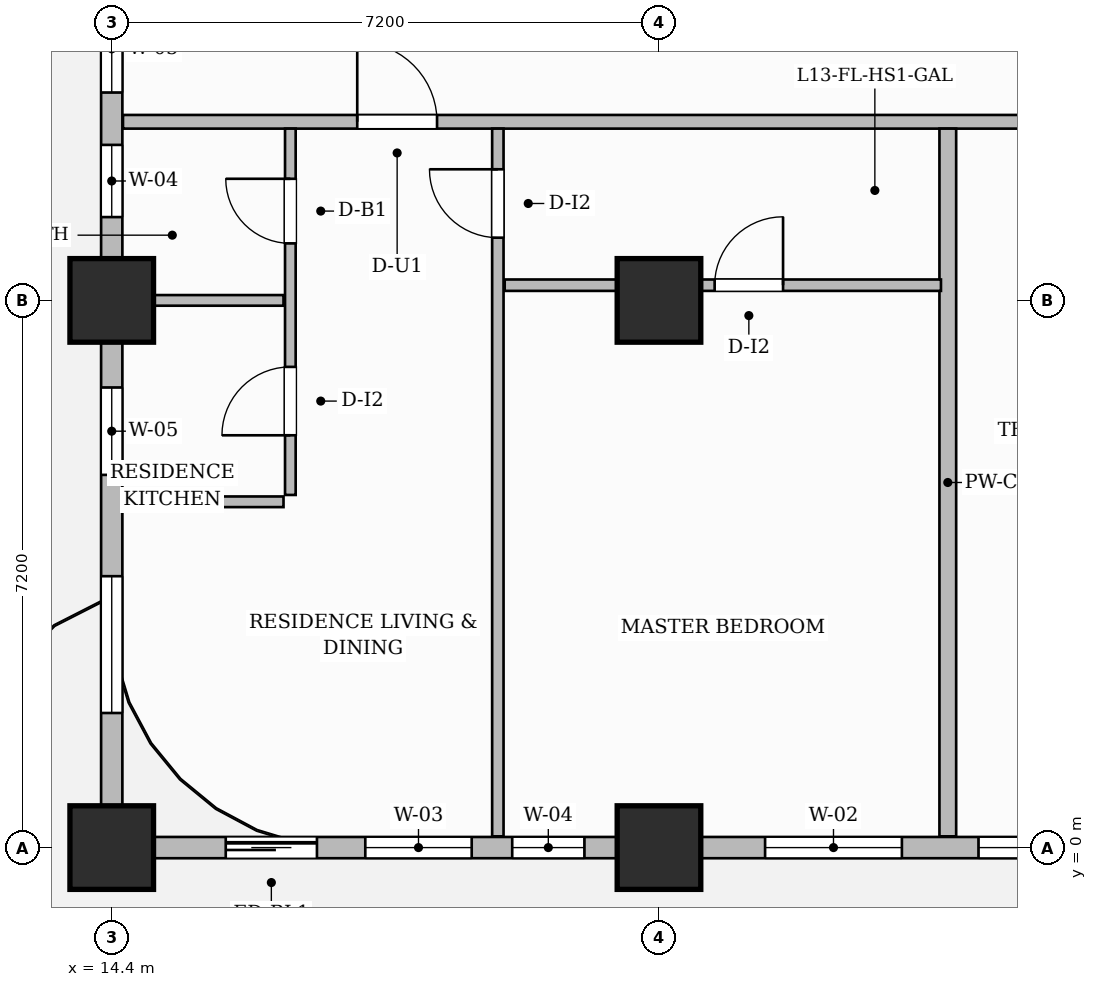
"""IFC4 building model, lengths in metres.
Left out: names, types, materials, properties, quantities, classifications, styles, units other than length and angle.
Written with IfcOpenShell. Run it as: python <this file> out.ifc"""

import sys

from ifc_helpers import new_model, si_unit, direction, frame, frame_2d, origin, origin_2d, place, context, subcontext, project, spatial, rectangle, extrude, source, transform, mapped, element, fill, save


model = new_model("IFC4")
c1 = context("Model", 3, precision=1e-05, world=origin(), true_north=direction((0.0, 1.0)))
c2 = subcontext(c1, "Body", "Model", "MODEL_VIEW")
j1 = project(units=[si_unit("LENGTHUNIT", "METRE"), si_unit("PLANEANGLEUNIT", "RADIAN")], contexts=[c1])
p1 = place(None, origin())
s1 = spatial("IfcSite", under=j1, at=p1, CompositionType="ELEMENT")
p2 = place(p1, origin())
s2 = spatial("IfcBuilding", under=s1, at=p2, CompositionType="ELEMENT")
p3 = place(p2, frame((0.0, 0.0, 58.3)))
s3 = spatial("IfcBuildingStorey", under=s2, at=p3, CompositionType="ELEMENT", Elevation=58.3)
m1 = source(origin(), c2, "Body", "SweptSolid", [
    extrude(rectangle(XDim=1.1, YDim=1.1, at=origin_2d()), origin(), (0.0, 0.0, 1.0), 3.7),
])
for number, where, z_axis, x_axis in (
    (1, (14.4, 0.0, 0.0), (0.0, 0.0, 1.0), (1.0, 0.0, 0.0)),
    (2, (14.4, 7.2, 0.0), (0.0, 0.0, 1.0), (1.0, 0.0, 0.0)),
    (3, (21.6, 0.0, 0.0), (0.0, 0.0, 1.0), (1.0, 0.0, 0.0)),
    (4, (21.6, 7.2, 0.0), (0.0, 0.0, 1.0), (1.0, 0.0, 0.0)),
):
    element("IfcColumn", number, at=place(p3, frame(where, z_axis=z_axis, x_axis=x_axis)), inside=s3, PredefinedType="COLUMN", context=c2, shape_type="MappedRepresentation", body=[
        mapped(m1, transform((0.0, 0.0, 0.0), scale=1.0)),
    ])
p4 = place(p3, frame((14.548, 9.55, 0.0), z_axis=(0.0, 0.0, 1.0), x_axis=(1.0, 0.0, 0.0)))
e5 = element("IfcWall", 5, at=p4, inside=s3, PredefinedType="PARTITIONING", context=c2, shape_type="SweptSolid", body=[
    extrude(rectangle(XDim=15.562, YDim=0.18, at=frame_2d((7.781, 0.0))), origin(), (0.0, 0.0, 1.0), 3.45),
])
p5 = place(p4, frame((3.082, 0.0, 0.0)))
e6 = element("IfcOpeningElement", 6, at=p5, cuts=e5, PredefinedType="OPENING", context=c2, shape_type="SweptSolid", body=[
    extrude(rectangle(XDim=1.05, YDim=2.25, at=frame_2d((0.525, 1.125))), frame((0.0, 0.1, 0.0), z_axis=(0.0, -1.0, 0.0), x_axis=(1.0, 0.0, 0.0)), (0.0, 0.0, 1.0), 0.2),
])
p6 = place(p4, frame((12.552, 0.0, 0.0)))
e7 = element("IfcOpeningElement", 7, at=p6, cuts=e5, PredefinedType="OPENING", context=c2, shape_type="SweptSolid", body=[
    extrude(rectangle(XDim=1.4, YDim=2.35, at=frame_2d((0.7, 1.175))), frame((0.0, 0.1, 0.0), z_axis=(0.0, -1.0, 0.0), x_axis=(1.0, 0.0, 0.0)), (0.0, 0.0, 1.0), 0.2),
])
p7 = place(p3, frame((25.4, 0.148, 0.0), z_axis=(0.0, 0.0, 1.0), x_axis=(0.0, 1.0, 0.0)))
e8 = element("IfcWall", 8, at=p7, inside=s3, PredefinedType="PARTITIONING", context=c2, shape_type="SweptSolid", body=[
    extrude(rectangle(XDim=9.312, YDim=0.22, at=frame_2d((4.656, 0.0))), origin(), (0.0, 0.0, 1.0), 3.035),
])
p8 = place(p3, frame((16.75, 4.64, 0.0), z_axis=(0.0, 0.0, 1.0), x_axis=(0.0, 1.0, 0.0)))
e9 = element("IfcWall", 9, at=p8, inside=s3, PredefinedType="PARTITIONING", context=c2, shape_type="SweptSolid", body=[
    extrude(rectangle(XDim=4.82, YDim=0.14, at=frame_2d((2.41, 0.0))), origin(), (0.0, 0.0, 1.0), 3.45),
])
p9 = place(p8, frame((0.785, 0.0, 0.0)))
e10 = element("IfcOpeningElement", 10, at=p9, cuts=e9, PredefinedType="OPENING", context=c2, shape_type="SweptSolid", body=[
    extrude(rectangle(XDim=0.9, YDim=2.15, at=frame_2d((0.45, 1.075))), frame((0.0, 0.08, 0.0), z_axis=(0.0, -1.0, 0.0), x_axis=(1.0, 0.0, 0.0)), (0.0, 0.0, 1.0), 0.16),
])
p10 = place(p8, frame((3.31, 0.0, 0.0)))
e11 = element("IfcOpeningElement", 11, at=p10, cuts=e9, PredefinedType="OPENING", context=c2, shape_type="SweptSolid", body=[
    extrude(rectangle(XDim=0.85, YDim=2.1, at=frame_2d((0.425, 1.05))), frame((0.0, 0.08, 0.0), z_axis=(0.0, -1.0, 0.0), x_axis=(1.0, 0.0, 0.0)), (0.0, 0.0, 1.0), 0.16),
])
p11 = place(p3, frame((14.59, 7.2, 0.0), z_axis=(0.0, 0.0, 1.0), x_axis=(1.0, 0.0, 0.0)))
e12 = element("IfcWall", 12, at=p11, inside=s3, PredefinedType="PARTITIONING", context=c2, shape_type="SweptSolid", body=[
    extrude(rectangle(XDim=2.07, YDim=0.14, at=frame_2d((1.035, 0.0))), origin(), (0.0, 0.0, 1.0), 2.885),
])
p12 = place(p3, frame((14.548, 4.55, 0.0), z_axis=(0.0, 0.0, 1.0), x_axis=(1.0, 0.0, 0.0)))
e13 = element("IfcWall", 13, at=p12, inside=s3, PredefinedType="PARTITIONING", context=c2, shape_type="SweptSolid", body=[
    extrude(rectangle(XDim=2.112, YDim=0.14, at=frame_2d((1.056, 0.0))), origin(), (0.0, 0.0, 1.0), 3.45),
])
p13 = place(p3, frame((19.48, 0.148, 0.0), z_axis=(0.0, 0.0, 1.0), x_axis=(0.0, 1.0, 0.0)))
e14 = element("IfcWall", 14, at=p13, inside=s3, PredefinedType="PARTITIONING", context=c2, shape_type="SweptSolid", body=[
    extrude(rectangle(XDim=9.312, YDim=0.15, at=frame_2d((4.656, 0.0))), origin(), (0.0, 0.0, 1.0), 3.45),
])
p14 = place(p13, frame((7.877, 0.0, 0.0)))
e15 = element("IfcOpeningElement", 15, at=p14, cuts=e14, PredefinedType="OPENING", context=c2, shape_type="SweptSolid", body=[
    extrude(rectangle(XDim=0.9, YDim=2.15, at=frame_2d((0.45, 1.075))), frame((0.0, 0.085, 0.0), z_axis=(0.0, -1.0, 0.0), x_axis=(1.0, 0.0, 0.0)), (0.0, 0.0, 1.0), 0.17),
])
p15 = place(p3, frame((19.57, 7.4, 0.0), z_axis=(0.0, 0.0, 1.0), x_axis=(1.0, 0.0, 0.0)))
e16 = element("IfcWall", 16, at=p15, inside=s3, PredefinedType="PARTITIONING", context=c2, shape_type="SweptSolid", body=[
    extrude(rectangle(XDim=5.74, YDim=0.15, at=frame_2d((2.87, 0.0))), origin(), (0.0, 0.0, 1.0), 2.885),
])
p16 = place(p15, frame((2.762, 0.0, 0.0)))
e17 = element("IfcOpeningElement", 17, at=p16, cuts=e16, PredefinedType="OPENING", context=c2, shape_type="SweptSolid", body=[
    extrude(rectangle(XDim=0.9, YDim=2.15, at=frame_2d((0.45, 1.075))), frame((0.0, 0.085, 0.0), z_axis=(0.0, -1.0, 0.0), x_axis=(1.0, 0.0, 0.0)), (0.0, 0.0, 1.0), 0.17),
])
p17 = place(p3, frame((14.4, 0.0, 0.0), z_axis=(0.0, 0.0, 1.0), x_axis=(1.0, 0.0, 0.0)))
e18 = element("IfcWall", 18, at=p17, inside=s3, PredefinedType="SOLIDWALL", context=c2, shape_type="SweptSolid", body=[
    extrude(rectangle(XDim=43.2, YDim=0.28, at=frame_2d((21.6, 0.0))), origin(), (0.0, 0.0, 1.0), 2.885),
])
p18 = place(p17, frame((1.5, 0.0, 0.0)))
e19 = element("IfcOpeningElement", 19, at=p18, cuts=e18, PredefinedType="OPENING", context=c2, shape_type="SweptSolid", body=[
    extrude(rectangle(XDim=1.2, YDim=2.2, at=frame_2d((0.6, 1.1))), frame((0.0, 0.15, 0.0), z_axis=(0.0, -1.0, 0.0), x_axis=(1.0, 0.0, 0.0)), (0.0, 0.0, 1.0), 0.3),
])
p19 = place(p17, frame((3.336, 0.0, 0.8)))
e20 = element("IfcOpeningElement", 20, at=p19, cuts=e18, PredefinedType="OPENING", context=c2, shape_type="SweptSolid", body=[
    extrude(rectangle(XDim=1.4, YDim=1.85, at=frame_2d((0.7, 0.925))), frame((0.0, 0.15, 0.0), z_axis=(0.0, -1.0, 0.0), x_axis=(1.0, 0.0, 0.0)), (0.0, 0.0, 1.0), 0.3),
])
p20 = place(p17, frame((5.269, 0.0, 0.8)))
e21 = element("IfcOpeningElement", 21, at=p20, cuts=e18, PredefinedType="OPENING", context=c2, shape_type="SweptSolid", body=[
    extrude(rectangle(XDim=0.95, YDim=1.75, at=frame_2d((0.475, 0.875))), frame((0.0, 0.15, 0.0), z_axis=(0.0, -1.0, 0.0), x_axis=(1.0, 0.0, 0.0)), (0.0, 0.0, 1.0), 0.3),
])
p21 = place(p17, frame((8.596, 0.0, 0.8)))
e22 = element("IfcOpeningElement", 22, at=p21, cuts=e18, PredefinedType="OPENING", context=c2, shape_type="SweptSolid", body=[
    extrude(rectangle(XDim=1.8, YDim=1.85, at=frame_2d((0.9, 0.925))), frame((0.0, 0.15, 0.0), z_axis=(0.0, -1.0, 0.0), x_axis=(1.0, 0.0, 0.0)), (0.0, 0.0, 1.0), 0.3),
])
p22 = place(p17, frame((11.404, 0.0, 0.8)))
e23 = element("IfcOpeningElement", 23, at=p22, cuts=e18, PredefinedType="OPENING", context=c2, shape_type="SweptSolid", body=[
    extrude(rectangle(XDim=1.8, YDim=1.85, at=frame_2d((0.9, 0.925))), frame((0.0, 0.15, 0.0), z_axis=(0.0, -1.0, 0.0), x_axis=(1.0, 0.0, 0.0)), (0.0, 0.0, 1.0), 0.3),
])
p23 = place(p17, frame((16.804, 0.0, 0.8)))
e24 = element("IfcOpeningElement", 24, at=p23, cuts=e18, PredefinedType="OPENING", context=c2, shape_type="SweptSolid", body=[
    extrude(rectangle(XDim=1.8, YDim=1.85, at=frame_2d((0.9, 0.925))), frame((0.0, 0.15, 0.0), z_axis=(0.0, -1.0, 0.0), x_axis=(1.0, 0.0, 0.0)), (0.0, 0.0, 1.0), 0.3),
])
p24 = place(p17, frame((21.725, 0.0, 0.8)))
e25 = element("IfcOpeningElement", 25, at=p24, cuts=e18, PredefinedType="OPENING", context=c2, shape_type="SweptSolid", body=[
    extrude(rectangle(XDim=1.8, YDim=1.85, at=frame_2d((0.9, 0.925))), frame((0.0, 0.15, 0.0), z_axis=(0.0, -1.0, 0.0), x_axis=(1.0, 0.0, 0.0)), (0.0, 0.0, 1.0), 0.3),
])
p25 = place(p17, frame((24.475, 0.0, 0.8)))
e26 = element("IfcOpeningElement", 26, at=p25, cuts=e18, PredefinedType="OPENING", context=c2, shape_type="SweptSolid", body=[
    extrude(rectangle(XDim=1.8, YDim=1.85, at=frame_2d((0.9, 0.925))), frame((0.0, 0.15, 0.0), z_axis=(0.0, -1.0, 0.0), x_axis=(1.0, 0.0, 0.0)), (0.0, 0.0, 1.0), 0.3),
])
p26 = place(p17, frame((29.075, 0.0, 0.8)))
e27 = element("IfcOpeningElement", 27, at=p26, cuts=e18, PredefinedType="OPENING", context=c2, shape_type="SweptSolid", body=[
    extrude(rectangle(XDim=1.8, YDim=1.85, at=frame_2d((0.9, 0.925))), frame((0.0, 0.15, 0.0), z_axis=(0.0, -1.0, 0.0), x_axis=(1.0, 0.0, 0.0)), (0.0, 0.0, 1.0), 0.3),
])
p27 = place(p17, frame((32.125, 0.0, 0.8)))
e28 = element("IfcOpeningElement", 28, at=p27, cuts=e18, PredefinedType="OPENING", context=c2, shape_type="SweptSolid", body=[
    extrude(rectangle(XDim=1.8, YDim=1.85, at=frame_2d((0.9, 0.925))), frame((0.0, 0.15, 0.0), z_axis=(0.0, -1.0, 0.0), x_axis=(1.0, 0.0, 0.0)), (0.0, 0.0, 1.0), 0.3),
])
p28 = place(p17, frame((36.875, 0.0, 0.8)))
e29 = element("IfcOpeningElement", 29, at=p28, cuts=e18, PredefinedType="OPENING", context=c2, shape_type="SweptSolid", body=[
    extrude(rectangle(XDim=1.8, YDim=1.85, at=frame_2d((0.9, 0.925))), frame((0.0, 0.15, 0.0), z_axis=(0.0, -1.0, 0.0), x_axis=(1.0, 0.0, 0.0)), (0.0, 0.0, 1.0), 0.3),
])
p29 = place(p17, frame((39.925, 0.0, 0.8)))
e30 = element("IfcOpeningElement", 30, at=p29, cuts=e18, PredefinedType="OPENING", context=c2, shape_type="SweptSolid", body=[
    extrude(rectangle(XDim=1.8, YDim=1.85, at=frame_2d((0.9, 0.925))), frame((0.0, 0.15, 0.0), z_axis=(0.0, -1.0, 0.0), x_axis=(1.0, 0.0, 0.0)), (0.0, 0.0, 1.0), 0.3),
])
p30 = place(p3, frame((14.4, 0.05, 0.0), z_axis=(0.0, 0.0, 1.0), x_axis=(0.0, 1.0, 0.0)))
e31 = element("IfcWall", 31, at=p30, inside=s3, PredefinedType="SOLIDWALL", context=c2, shape_type="SweptSolid", body=[
    extrude(rectangle(XDim=21.5, YDim=0.28, at=frame_2d((10.75, 0.0))), origin(), (0.0, 0.0, 1.0), 2.885),
])
p31 = place(p30, frame((1.721, 0.0, 0.8)))
e32 = element("IfcOpeningElement", 32, at=p31, cuts=e31, PredefinedType="OPENING", context=c2, shape_type="SweptSolid", body=[
    extrude(rectangle(XDim=1.8, YDim=1.85, at=frame_2d((0.9, 0.925))), frame((0.0, 0.15, 0.0), z_axis=(0.0, -1.0, 0.0), x_axis=(1.0, 0.0, 0.0)), (0.0, 0.0, 1.0), 0.3),
])
p32 = place(p30, frame((4.854, 0.0, 0.8)))
e33 = element("IfcOpeningElement", 33, at=p32, cuts=e31, PredefinedType="OPENING", context=c2, shape_type="SweptSolid", body=[
    extrude(rectangle(XDim=1.15, YDim=1.8, at=frame_2d((0.575, 0.9))), frame((0.0, 0.15, 0.0), z_axis=(0.0, -1.0, 0.0), x_axis=(1.0, 0.0, 0.0)), (0.0, 0.0, 1.0), 0.3),
])
p33 = place(p30, frame((8.246, 0.0, 0.8)))
e34 = element("IfcOpeningElement", 34, at=p33, cuts=e31, PredefinedType="OPENING", context=c2, shape_type="SweptSolid", body=[
    extrude(rectangle(XDim=0.95, YDim=1.75, at=frame_2d((0.475, 0.875))), frame((0.0, 0.15, 0.0), z_axis=(0.0, -1.0, 0.0), x_axis=(1.0, 0.0, 0.0)), (0.0, 0.0, 1.0), 0.3),
])
p34 = place(p30, frame((9.885, 0.0, 0.8)))
e35 = element("IfcOpeningElement", 35, at=p34, cuts=e31, PredefinedType="OPENING", context=c2, shape_type="SweptSolid", body=[
    extrude(rectangle(XDim=1.15, YDim=1.8, at=frame_2d((0.575, 0.9))), frame((0.0, 0.15, 0.0), z_axis=(0.0, -1.0, 0.0), x_axis=(1.0, 0.0, 0.0)), (0.0, 0.0, 1.0), 0.3),
])
p35 = place(p30, frame((11.789, 0.0, 0.8)))
e36 = element("IfcOpeningElement", 36, at=p35, cuts=e31, PredefinedType="OPENING", context=c2, shape_type="SweptSolid", body=[
    extrude(rectangle(XDim=1.4, YDim=1.85, at=frame_2d((0.7, 0.925))), frame((0.0, 0.15, 0.0), z_axis=(0.0, -1.0, 0.0), x_axis=(1.0, 0.0, 0.0)), (0.0, 0.0, 1.0), 0.3),
])
p36 = place(p30, frame((15.675, 0.0, 0.8)))
e37 = element("IfcOpeningElement", 37, at=p36, cuts=e31, PredefinedType="OPENING", context=c2, shape_type="SweptSolid", body=[
    extrude(rectangle(XDim=1.8, YDim=1.85, at=frame_2d((0.9, 0.925))), frame((0.0, 0.15, 0.0), z_axis=(0.0, -1.0, 0.0), x_axis=(1.0, 0.0, 0.0)), (0.0, 0.0, 1.0), 0.3),
])
p37 = place(p30, frame((18.425, 0.0, 0.8)))
e38 = element("IfcOpeningElement", 38, at=p37, cuts=e31, PredefinedType="OPENING", context=c2, shape_type="SweptSolid", body=[
    extrude(rectangle(XDim=1.8, YDim=1.85, at=frame_2d((0.9, 0.925))), frame((0.0, 0.15, 0.0), z_axis=(0.0, -1.0, 0.0), x_axis=(1.0, 0.0, 0.0)), (0.0, 0.0, 1.0), 0.3),
])
m2 = source(origin(), c2, "Body", "SweptSolid", [
    extrude(rectangle(XDim=0.9, YDim=2.15, at=frame_2d((0.45, 1.075))), frame((0.0, 0.025, 0.0), z_axis=(0.0, -1.0, 0.0), x_axis=(1.0, 0.0, 0.0)), (0.0, 0.0, 1.0), 0.05),
])
p38 = place(p9, origin())
e39 = element("IfcDoor", 39, at=p38, inside=s3, OperationType="SINGLE_SWING_LEFT", PredefinedType="DOOR", context=c2, shape_type="MappedRepresentation", body=[
    mapped(m2, transform((0.0, 0.0, 0.0), scale=1.0)),
])
fill(e10, e39)
m3 = source(origin(), c2, "Body", "SweptSolid", [
    extrude(rectangle(XDim=0.85, YDim=2.1, at=frame_2d((0.425, 1.05))), frame((0.0, 0.025, 0.0), z_axis=(0.0, -1.0, 0.0), x_axis=(1.0, 0.0, 0.0)), (0.0, 0.0, 1.0), 0.05),
])
p39 = place(p10, origin())
e40 = element("IfcDoor", 40, at=p39, inside=s3, OperationType="SINGLE_SWING_RIGHT", PredefinedType="DOOR", context=c2, shape_type="MappedRepresentation", body=[
    mapped(m3, transform((0.0, 0.0, 0.0), scale=1.0)),
])
fill(e11, e40)
m4 = source(origin(), c2, "Body", "SweptSolid", [
    extrude(rectangle(XDim=1.05, YDim=2.25, at=frame_2d((0.525, 1.125))), frame((0.0, 0.025, 0.0), z_axis=(0.0, -1.0, 0.0), x_axis=(1.0, 0.0, 0.0)), (0.0, 0.0, 1.0), 0.05),
])
p40 = place(p5, origin())
e41 = element("IfcDoor", 41, at=p40, inside=s3, OperationType="SINGLE_SWING_LEFT", PredefinedType="DOOR", context=c2, shape_type="MappedRepresentation", body=[
    mapped(m4, transform((0.0, 0.0, 0.0), scale=1.0)),
])
fill(e6, e41)
p41 = place(p14, origin())
e42 = element("IfcDoor", 42, at=p41, inside=s3, OperationType="SINGLE_SWING_RIGHT", PredefinedType="DOOR", context=c2, shape_type="MappedRepresentation", body=[
    mapped(m2, transform((0.0, 0.0, 0.0), scale=1.0)),
])
fill(e15, e42)
p42 = place(p16, origin())
e43 = element("IfcDoor", 43, at=p42, inside=s3, OperationType="SINGLE_SWING_RIGHT", PredefinedType="DOOR", context=c2, shape_type="MappedRepresentation", body=[
    mapped(m2, transform((0.0, 0.0, 0.0), scale=1.0)),
])
fill(e17, e43)
m5 = source(origin(), c2, "Body", "SweptSolid", [
    extrude(rectangle(XDim=1.2, YDim=2.2, at=frame_2d((0.6, 1.1))), frame((0.0, 0.025, 0.0), z_axis=(0.0, -1.0, 0.0), x_axis=(1.0, 0.0, 0.0)), (0.0, 0.0, 1.0), 0.05),
])
p43 = place(p18, origin())
e44 = element("IfcDoor", 44, at=p43, inside=s3, OperationType="SLIDING_TO_LEFT", PredefinedType="DOOR", context=c2, shape_type="MappedRepresentation", body=[
    mapped(m5, transform((0.0, 0.0, 0.0), scale=1.0)),
])
fill(e19, e44)
m6 = source(origin(), c2, "Body", "SweptSolid", [
    extrude(rectangle(XDim=1.4, YDim=1.85, at=frame_2d((0.7, 0.925))), frame((0.0, 0.03, 0.0), z_axis=(0.0, -1.0, 0.0), x_axis=(1.0, 0.0, 0.0)), (0.0, 0.0, 1.0), 0.06),
])
p44 = place(p19, origin())
e45 = element("IfcWindow", 45, at=p44, inside=s3, PartitioningType="SINGLE_PANEL", PredefinedType="WINDOW", context=c2, shape_type="MappedRepresentation", body=[
    mapped(m6, transform((0.0, 0.0, 0.0), scale=1.0)),
])
fill(e20, e45)
m7 = source(origin(), c2, "Body", "SweptSolid", [
    extrude(rectangle(XDim=0.95, YDim=1.75, at=frame_2d((0.475, 0.875))), frame((0.0, 0.03, 0.0), z_axis=(0.0, -1.0, 0.0), x_axis=(1.0, 0.0, 0.0)), (0.0, 0.0, 1.0), 0.06),
])
p45 = place(p20, origin())
e46 = element("IfcWindow", 46, at=p45, inside=s3, PartitioningType="SINGLE_PANEL", PredefinedType="WINDOW", context=c2, shape_type="MappedRepresentation", body=[
    mapped(m7, transform((0.0, 0.0, 0.0), scale=1.0)),
])
fill(e21, e46)
m8 = source(origin(), c2, "Body", "SweptSolid", [
    extrude(rectangle(XDim=1.8, YDim=1.85, at=frame_2d((0.9, 0.925))), frame((0.0, 0.03, 0.0), z_axis=(0.0, -1.0, 0.0), x_axis=(1.0, 0.0, 0.0)), (0.0, 0.0, 1.0), 0.06),
])
p46 = place(p21, origin())
e47 = element("IfcWindow", 47, at=p46, inside=s3, PartitioningType="DOUBLE_PANEL_VERTICAL", PredefinedType="WINDOW", context=c2, shape_type="MappedRepresentation", body=[
    mapped(m8, transform((0.0, 0.0, 0.0), scale=1.0)),
])
fill(e22, e47)
p47 = place(p22, origin())
e48 = element("IfcWindow", 48, at=p47, inside=s3, PartitioningType="DOUBLE_PANEL_VERTICAL", PredefinedType="WINDOW", context=c2, shape_type="MappedRepresentation", body=[
    mapped(m8, transform((0.0, 0.0, 0.0), scale=1.0)),
])
fill(e23, e48)
p48 = place(p31, origin())
e49 = element("IfcWindow", 49, at=p48, inside=s3, PartitioningType="DOUBLE_PANEL_VERTICAL", PredefinedType="WINDOW", context=c2, shape_type="MappedRepresentation", body=[
    mapped(m8, transform((0.0, 0.0, 0.0), scale=1.0)),
])
fill(e32, e49)
m9 = source(origin(), c2, "Body", "SweptSolid", [
    extrude(rectangle(XDim=1.15, YDim=1.8, at=frame_2d((0.575, 0.9))), frame((0.0, 0.03, 0.0), z_axis=(0.0, -1.0, 0.0), x_axis=(1.0, 0.0, 0.0)), (0.0, 0.0, 1.0), 0.06),
])
p49 = place(p32, origin())
e50 = element("IfcWindow", 50, at=p49, inside=s3, PartitioningType="SINGLE_PANEL", PredefinedType="WINDOW", context=c2, shape_type="MappedRepresentation", body=[
    mapped(m9, transform((0.0, 0.0, 0.0), scale=1.0)),
])
fill(e33, e50)
p50 = place(p33, origin())
e51 = element("IfcWindow", 51, at=p50, inside=s3, PartitioningType="SINGLE_PANEL", PredefinedType="WINDOW", context=c2, shape_type="MappedRepresentation", body=[
    mapped(m7, transform((0.0, 0.0, 0.0), scale=1.0)),
])
fill(e34, e51)
p51 = place(p34, origin())
e52 = element("IfcWindow", 52, at=p51, inside=s3, PartitioningType="SINGLE_PANEL", PredefinedType="WINDOW", context=c2, shape_type="MappedRepresentation", body=[
    mapped(m9, transform((0.0, 0.0, 0.0), scale=1.0)),
])
fill(e35, e52)
save(model, sys.argv[1])
